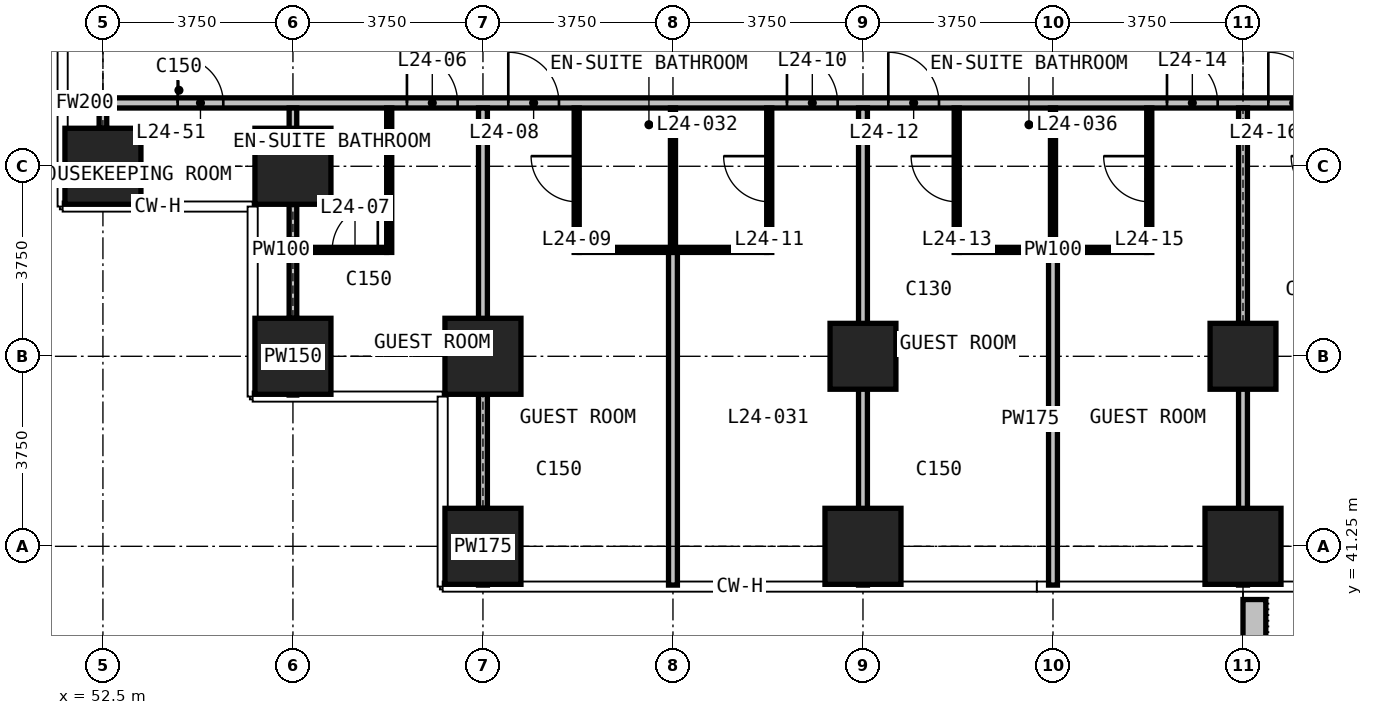
"""IFC4 building model, lengths in metres.
Left out: names, types, materials, properties, quantities, classifications, styles, units other than length and angle.
Written with IfcOpenShell. Run it as: python <this file> out.ifc"""

import sys

from ifc_helpers import new_model, si_unit, direction, frame, frame_2d, origin, origin_2d, place, context, subcontext, project, spatial, rectangle, extrude, element, fill, save


model = new_model("IFC4")
c1 = context("Model", 3, precision=1e-05, world=origin(), true_north=direction((0.0, 1.0)))
c2 = subcontext(c1, "Body", "Model", "MODEL_VIEW")
j1 = project(units=[si_unit("LENGTHUNIT", "METRE"), si_unit("PLANEANGLEUNIT", "RADIAN")], contexts=[c1])
p1 = place(None, origin())
s1 = spatial("IfcSite", under=j1, at=p1, CompositionType="ELEMENT")
p2 = place(p1, origin())
s2 = spatial("IfcBuilding", under=s1, at=p2, CompositionType="ELEMENT")
p3 = place(p2, frame((0.0, 0.0, 98.9)))
s3 = spatial("IfcBuildingStorey", under=s2, at=p3, CompositionType="ELEMENT", Elevation=98.9)
for number, where, z_axis, x_axis in (
    (1, (52.5, 48.75, 0.0), (0.0, 0.0, 1.0), (1.0, 0.0, 0.0)),
    (2, (56.25, 45.0, 0.0), (0.0, 0.0, 1.0), (1.0, 0.0, 0.0)),
    (3, (56.25, 48.75, 0.0), (0.0, 0.0, 1.0), (1.0, 0.0, 0.0)),
    (4, (60.0, 41.25, 0.0), (0.0, 0.0, 1.0), (1.0, 0.0, 0.0)),
    (5, (60.0, 45.0, 0.0), (0.0, 0.0, 1.0), (1.0, 0.0, 0.0)),
    (6, (67.5, 41.25, 0.0), (0.0, 0.0, 1.0), (1.0, 0.0, 0.0)),
):
    element("IfcColumn", number, at=place(p3, frame(where, z_axis=z_axis, x_axis=x_axis)), inside=s3, PredefinedType="COLUMN", context=c2, shape_type="SweptSolid", body=[
        extrude(rectangle(XDim=1.5, YDim=1.5, at=origin_2d()), origin(), (0.0, 0.0, 1.0), 3.3),
    ])
p4 = place(p3, frame((67.5, 45.0, 0.0), z_axis=(0.0, 0.0, 1.0), x_axis=(1.0, 0.0, 0.0)))
e7 = element("IfcColumn", 7, at=p4, inside=s3, PredefinedType="COLUMN", context=c2, shape_type="SweptSolid", body=[
    extrude(rectangle(XDim=1.3, YDim=1.3, at=origin_2d()), origin(), (0.0, 0.0, 1.0), 3.3),
])
p5 = place(p3, frame((75.0, 41.25, 0.0), z_axis=(0.0, 0.0, 1.0), x_axis=(1.0, 0.0, 0.0)))
e8 = element("IfcColumn", 8, at=p5, inside=s3, PredefinedType="COLUMN", context=c2, shape_type="SweptSolid", body=[
    extrude(rectangle(XDim=1.5, YDim=1.5, at=origin_2d()), origin(), (0.0, 0.0, 1.0), 3.3),
])
p6 = place(p3, frame((75.0, 45.0, 0.0), z_axis=(0.0, 0.0, 1.0), x_axis=(1.0, 0.0, 0.0)))
e9 = element("IfcColumn", 9, at=p6, inside=s3, PredefinedType="COLUMN", context=c2, shape_type="SweptSolid", body=[
    extrude(rectangle(XDim=1.3, YDim=1.3, at=origin_2d()), origin(), (0.0, 0.0, 1.0), 3.3),
])
p7 = place(p3, frame((75.225, 40.2, 0.0), z_axis=(0.0, 0.0, 1.0), x_axis=(0.0, -1.0, 0.0)))
e10 = element("IfcWall", 10, at=p7, inside=s3, PredefinedType="USERDEFINED", context=c2, shape_type="SweptSolid", body=[
    extrude(rectangle(XDim=2.35, YDim=0.45, at=frame_2d((1.175, 0.0))), origin(), (0.0, 0.0, 1.0), 1.1),
])
p8 = place(p3, frame((51.855, 50.0, 0.0), z_axis=(0.0, 0.0, 1.0), x_axis=(1.0, 0.0, 0.0)))
e11 = element("IfcWall", 11, at=p8, inside=s3, PredefinedType="PARTITIONING", context=c2, shape_type="SweptSolid", body=[
    extrude(rectangle(XDim=0.57, YDim=0.2, at=frame_2d((0.285, 0.0))), origin(), (0.0, 0.0, 1.0), 2.95),
])
p9 = place(p3, frame((52.575, 50.0, 0.0), z_axis=(0.0, 0.0, 1.0), x_axis=(1.0, 0.0, 0.0)))
e12 = element("IfcWall", 12, at=p9, inside=s3, PredefinedType="PARTITIONING", context=c2, shape_type="SweptSolid", body=[
    extrude(rectangle(XDim=44.85, YDim=0.2, at=frame_2d((22.425, 0.0))), origin(), (0.0, 0.0, 1.0), 2.95),
])
p10 = place(p9, frame((5.925, 0.0, 0.0)))
e13 = element("IfcOpeningElement", 13, at=p10, cuts=e12, PredefinedType="OPENING", context=c2, shape_type="SweptSolid", body=[
    extrude(rectangle(XDim=1.0, YDim=2.2, at=frame_2d((0.5, 1.1))), frame((0.0, 0.11, 0.0), z_axis=(0.0, -1.0, 0.0), x_axis=(1.0, 0.0, 0.0)), (0.0, 0.0, 1.0), 0.22),
])
p11 = place(p9, frame((7.925, 0.0, 0.0)))
e14 = element("IfcOpeningElement", 14, at=p11, cuts=e12, PredefinedType="OPENING", context=c2, shape_type="SweptSolid", body=[
    extrude(rectangle(XDim=1.0, YDim=2.2, at=frame_2d((0.5, 1.1))), frame((0.0, 0.11, 0.0), z_axis=(0.0, -1.0, 0.0), x_axis=(1.0, 0.0, 0.0)), (0.0, 0.0, 1.0), 0.22),
])
p12 = place(p9, frame((13.425, 0.0, 0.0)))
e15 = element("IfcOpeningElement", 15, at=p12, cuts=e12, PredefinedType="OPENING", context=c2, shape_type="SweptSolid", body=[
    extrude(rectangle(XDim=1.0, YDim=2.2, at=frame_2d((0.5, 1.1))), frame((0.0, 0.11, 0.0), z_axis=(0.0, -1.0, 0.0), x_axis=(1.0, 0.0, 0.0)), (0.0, 0.0, 1.0), 0.22),
])
p13 = place(p9, frame((15.425, 0.0, 0.0)))
e16 = element("IfcOpeningElement", 16, at=p13, cuts=e12, PredefinedType="OPENING", context=c2, shape_type="SweptSolid", body=[
    extrude(rectangle(XDim=1.0, YDim=2.2, at=frame_2d((0.5, 1.1))), frame((0.0, 0.11, 0.0), z_axis=(0.0, -1.0, 0.0), x_axis=(1.0, 0.0, 0.0)), (0.0, 0.0, 1.0), 0.22),
])
p14 = place(p9, frame((20.925, 0.0, 0.0)))
e17 = element("IfcOpeningElement", 17, at=p14, cuts=e12, PredefinedType="OPENING", context=c2, shape_type="SweptSolid", body=[
    extrude(rectangle(XDim=1.0, YDim=2.2, at=frame_2d((0.5, 1.1))), frame((0.0, 0.11, 0.0), z_axis=(0.0, -1.0, 0.0), x_axis=(1.0, 0.0, 0.0)), (0.0, 0.0, 1.0), 0.22),
])
p15 = place(p9, frame((22.925, 0.0, 0.0)))
e18 = element("IfcOpeningElement", 18, at=p15, cuts=e12, PredefinedType="OPENING", context=c2, shape_type="SweptSolid", body=[
    extrude(rectangle(XDim=1.0, YDim=2.2, at=frame_2d((0.5, 1.1))), frame((0.0, 0.11, 0.0), z_axis=(0.0, -1.0, 0.0), x_axis=(1.0, 0.0, 0.0)), (0.0, 0.0, 1.0), 0.22),
])
p16 = place(p9, frame((28.425, 0.0, 0.0)))
e19 = element("IfcOpeningElement", 19, at=p16, cuts=e12, PredefinedType="OPENING", context=c2, shape_type="SweptSolid", body=[
    extrude(rectangle(XDim=1.0, YDim=2.2, at=frame_2d((0.5, 1.1))), frame((0.0, 0.11, 0.0), z_axis=(0.0, -1.0, 0.0), x_axis=(1.0, 0.0, 0.0)), (0.0, 0.0, 1.0), 0.22),
])
p17 = place(p9, frame((30.425, 0.0, 0.0)))
e20 = element("IfcOpeningElement", 20, at=p17, cuts=e12, PredefinedType="OPENING", context=c2, shape_type="SweptSolid", body=[
    extrude(rectangle(XDim=1.0, YDim=2.2, at=frame_2d((0.5, 1.1))), frame((0.0, 0.11, 0.0), z_axis=(0.0, -1.0, 0.0), x_axis=(1.0, 0.0, 0.0)), (0.0, 0.0, 1.0), 0.22),
])
p18 = place(p9, frame((35.925, 0.0, 0.0)))
e21 = element("IfcOpeningElement", 21, at=p18, cuts=e12, PredefinedType="OPENING", context=c2, shape_type="SweptSolid", body=[
    extrude(rectangle(XDim=1.0, YDim=2.2, at=frame_2d((0.5, 1.1))), frame((0.0, 0.11, 0.0), z_axis=(0.0, -1.0, 0.0), x_axis=(1.0, 0.0, 0.0)), (0.0, 0.0, 1.0), 0.22),
])
p19 = place(p9, frame((37.925, 0.0, 0.0)))
e22 = element("IfcOpeningElement", 22, at=p19, cuts=e12, PredefinedType="OPENING", context=c2, shape_type="SweptSolid", body=[
    extrude(rectangle(XDim=1.0, YDim=2.2, at=frame_2d((0.5, 1.1))), frame((0.0, 0.11, 0.0), z_axis=(0.0, -1.0, 0.0), x_axis=(1.0, 0.0, 0.0)), (0.0, 0.0, 1.0), 0.22),
])
p20 = place(p9, frame((1.4, 0.0, 0.0)))
e23 = element("IfcOpeningElement", 23, at=p20, cuts=e12, PredefinedType="OPENING", context=c2, shape_type="SweptSolid", body=[
    extrude(rectangle(XDim=0.9, YDim=2.2, at=frame_2d((0.45, 1.1))), frame((0.0, 0.11, 0.0), z_axis=(0.0, -1.0, 0.0), x_axis=(1.0, 0.0, 0.0)), (0.0, 0.0, 1.0), 0.22),
])
p21 = place(p9, frame((42.575, 0.0, 0.0)))
e24 = element("IfcOpeningElement", 24, at=p21, cuts=e12, PredefinedType="OPENING", context=c2, shape_type="SweptSolid", body=[
    extrude(rectangle(XDim=0.9, YDim=2.2, at=frame_2d((0.45, 1.1))), frame((0.0, 0.11, 0.0), z_axis=(0.0, -1.0, 0.0), x_axis=(1.0, 0.0, 0.0)), (0.0, 0.0, 1.0), 0.22),
])
p22 = place(p3, frame((60.0, 40.485, 0.0), z_axis=(0.0, 0.0, 1.0), x_axis=(0.0, 1.0, 0.0)))
e25 = element("IfcWall", 25, at=p22, inside=s3, PredefinedType="PARTITIONING", context=c2, shape_type="SweptSolid", body=[
    extrude(rectangle(XDim=1.515, YDim=0.175, at=frame_2d((0.757, 0.0))), origin(), (0.0, 0.0, 1.0), 2.95),
])
p23 = place(p3, frame((60.0, 42.0, 0.0), z_axis=(0.0, 0.0, 1.0), x_axis=(0.0, 1.0, 0.0)))
e26 = element("IfcWall", 26, at=p23, inside=s3, PredefinedType="PARTITIONING", context=c2, shape_type="SweptSolid", body=[
    extrude(rectangle(XDim=2.251, YDim=0.175, at=frame_2d((1.125, 0.0))), origin(), (0.0, 0.0, 1.0), 2.15),
])
p24 = place(p3, frame((60.0, 44.251, 0.0), z_axis=(0.0, 0.0, 1.0), x_axis=(0.0, 1.0, 0.0)))
e27 = element("IfcWall", 27, at=p24, inside=s3, PredefinedType="PARTITIONING", context=c2, shape_type="SweptSolid", body=[
    extrude(rectangle(XDim=5.649, YDim=0.175, at=frame_2d((2.824, 0.0))), origin(), (0.0, 0.0, 1.0), 2.95),
])
p25 = place(p3, frame((63.75, 40.485, 0.0), z_axis=(0.0, 0.0, 1.0), x_axis=(0.0, 1.0, 0.0)))
e28 = element("IfcWall", 28, at=p25, inside=s3, PredefinedType="PARTITIONING", context=c2, shape_type="SweptSolid", body=[
    extrude(rectangle(XDim=6.565, YDim=0.175, at=frame_2d((3.282, 0.0))), origin(), (0.0, 0.0, 1.0), 2.95),
])
p26 = place(p3, frame((67.5, 40.485, 0.0), z_axis=(0.0, 0.0, 1.0), x_axis=(0.0, 1.0, 0.0)))
e29 = element("IfcWall", 29, at=p26, inside=s3, PredefinedType="PARTITIONING", context=c2, shape_type="SweptSolid", body=[
    extrude(rectangle(XDim=9.415, YDim=0.175, at=frame_2d((4.708, 0.0))), origin(), (0.0, 0.0, 1.0), 2.95),
])
p27 = place(p3, frame((71.25, 40.485, 0.0), z_axis=(0.0, 0.0, 1.0), x_axis=(0.0, 1.0, 0.0)))
e30 = element("IfcWall", 30, at=p27, inside=s3, PredefinedType="PARTITIONING", context=c2, shape_type="SweptSolid", body=[
    extrude(rectangle(XDim=6.565, YDim=0.175, at=frame_2d((3.282, 0.0))), origin(), (0.0, 0.0, 1.0), 2.95),
])
p28 = place(p3, frame((75.0, 40.485, 0.0), z_axis=(0.0, 0.0, 1.0), x_axis=(0.0, 1.0, 0.0)))
e31 = element("IfcWall", 31, at=p28, inside=s3, PredefinedType="PARTITIONING", context=c2, shape_type="SweptSolid", body=[
    extrude(rectangle(XDim=5.164, YDim=0.175, at=frame_2d((2.582, 0.0))), origin(), (0.0, 0.0, 1.0), 2.95),
])
p29 = place(p3, frame((75.0, 45.649, 0.0), z_axis=(0.0, 0.0, 1.0), x_axis=(0.0, 1.0, 0.0)))
e32 = element("IfcWall", 32, at=p29, inside=s3, PredefinedType="PARTITIONING", context=c2, shape_type="SweptSolid", body=[
    extrude(rectangle(XDim=4.251, YDim=0.175, at=frame_2d((2.125, 0.0))), origin(), (0.0, 0.0, 1.0), 2.05),
])
p30 = place(p3, frame((52.5, 48.105, 0.0), z_axis=(0.0, 0.0, 1.0), x_axis=(0.0, 1.0, 0.0)))
e33 = element("IfcWall", 33, at=p30, inside=s3, PredefinedType="PARTITIONING", context=c2, shape_type="SweptSolid", body=[
    extrude(rectangle(XDim=1.395, YDim=0.15, at=frame_2d((0.698, 0.0))), origin(), (0.0, 0.0, 1.0), 2.95),
])
p31 = place(p3, frame((52.5, 49.5, 0.0), z_axis=(0.0, 0.0, 1.0), x_axis=(0.0, 1.0, 0.0)))
e34 = element("IfcWall", 34, at=p31, inside=s3, PredefinedType="PARTITIONING", context=c2, shape_type="SweptSolid", body=[
    extrude(rectangle(XDim=0.6, YDim=0.15, at=frame_2d((0.3, 0.0))), origin(), (0.0, 0.0, 1.0), 2.15),
])
p32 = place(p3, frame((56.25, 44.235, 0.0), z_axis=(0.0, 0.0, 1.0), x_axis=(0.0, 1.0, 0.0)))
e35 = element("IfcWall", 35, at=p32, inside=s3, PredefinedType="PARTITIONING", context=c2, shape_type="SweptSolid", body=[
    extrude(rectangle(XDim=1.515, YDim=0.15, at=frame_2d((0.757, 0.0))), origin(), (0.0, 0.0, 1.0), 2.95),
])
p33 = place(p3, frame((56.25, 45.75, 0.0), z_axis=(0.0, 0.0, 1.0), x_axis=(0.0, 1.0, 0.0)))
e36 = element("IfcWall", 36, at=p33, inside=s3, PredefinedType="PARTITIONING", context=c2, shape_type="SweptSolid", body=[
    extrude(rectangle(XDim=2.251, YDim=0.15, at=frame_2d((1.125, 0.0))), origin(), (0.0, 0.0, 1.0), 2.15),
])
p34 = place(p3, frame((56.25, 48.001, 0.0), z_axis=(0.0, 0.0, 1.0), x_axis=(0.0, 1.0, 0.0)))
e37 = element("IfcWall", 37, at=p34, inside=s3, PredefinedType="PARTITIONING", context=c2, shape_type="SweptSolid", body=[
    extrude(rectangle(XDim=1.899, YDim=0.15, at=frame_2d((0.949, 0.0))), origin(), (0.0, 0.0, 1.0), 2.95),
])
p35 = place(p3, frame((56.325, 47.1, 0.0), z_axis=(0.0, 0.0, 1.0), x_axis=(1.0, 0.0, 0.0)))
e38 = element("IfcWall", 38, at=p35, inside=s3, PredefinedType="PARTITIONING", context=c2, shape_type="SweptSolid", body=[
    extrude(rectangle(XDim=1.775, YDim=0.1, at=frame_2d((0.888, 0.0))), origin(), (0.0, 0.0, 1.0), 2.95),
])
p36 = place(p35, frame((0.7, 0.0, 0.0)))
e39 = element("IfcOpeningElement", 39, at=p36, cuts=e38, PredefinedType="OPENING", context=c2, shape_type="SweptSolid", body=[
    extrude(rectangle(XDim=0.9, YDim=2.2, at=frame_2d((0.45, 1.1))), frame((0.0, 0.06, 0.0), z_axis=(0.0, -1.0, 0.0), x_axis=(1.0, 0.0, 0.0)), (0.0, 0.0, 1.0), 0.12),
])
for number, where, z_axis, x_axis in (
    (40, (61.9, 47.1, 0.0), (0.0, 0.0, 1.0), (1.0, 0.0, 0.0)),
    (41, (69.4, 47.1, 0.0), (0.0, 0.0, 1.0), (1.0, 0.0, 0.0)),
):
    element("IfcWall", number, at=place(p3, frame(where, z_axis=z_axis, x_axis=x_axis)), inside=s3, PredefinedType="PARTITIONING", context=c2, shape_type="SweptSolid", body=[
        extrude(rectangle(XDim=3.7, YDim=0.1, at=frame_2d((1.85, 0.0))), origin(), (0.0, 0.0, 1.0), 2.95),
    ])
p37 = place(p3, frame((58.15, 47.05, 0.0), z_axis=(0.0, 0.0, 1.0), x_axis=(0.0, 1.0, 0.0)))
e42 = element("IfcWall", 42, at=p37, inside=s3, PredefinedType="PARTITIONING", context=c2, shape_type="SweptSolid", body=[
    extrude(rectangle(XDim=2.85, YDim=0.1, at=frame_2d((1.425, 0.0))), origin(), (0.0, 0.0, 1.0), 2.95),
])
p38 = place(p3, frame((61.85, 47.05, 0.0), z_axis=(0.0, 0.0, 1.0), x_axis=(0.0, 1.0, 0.0)))
e43 = element("IfcWall", 43, at=p38, inside=s3, PredefinedType="PARTITIONING", context=c2, shape_type="SweptSolid", body=[
    extrude(rectangle(XDim=2.85, YDim=0.1, at=frame_2d((1.425, 0.0))), origin(), (0.0, 0.0, 1.0), 2.95),
])
p39 = place(p38, frame((1.0, 0.0, 0.0)))
e44 = element("IfcOpeningElement", 44, at=p39, cuts=e43, PredefinedType="OPENING", context=c2, shape_type="SweptSolid", body=[
    extrude(rectangle(XDim=0.9, YDim=2.2, at=frame_2d((0.45, 1.1))), frame((0.0, 0.06, 0.0), z_axis=(0.0, -1.0, 0.0), x_axis=(1.0, 0.0, 0.0)), (0.0, 0.0, 1.0), 0.12),
])
p40 = place(p3, frame((63.75, 47.15, 0.0), z_axis=(0.0, 0.0, 1.0), x_axis=(0.0, 1.0, 0.0)))
e45 = element("IfcWall", 45, at=p40, inside=s3, PredefinedType="PARTITIONING", context=c2, shape_type="SweptSolid", body=[
    extrude(rectangle(XDim=2.75, YDim=0.1, at=frame_2d((1.375, 0.0))), origin(), (0.0, 0.0, 1.0), 2.95),
])
p41 = place(p3, frame((65.65, 47.05, 0.0), z_axis=(0.0, 0.0, 1.0), x_axis=(0.0, 1.0, 0.0)))
e46 = element("IfcWall", 46, at=p41, inside=s3, PredefinedType="PARTITIONING", context=c2, shape_type="SweptSolid", body=[
    extrude(rectangle(XDim=2.85, YDim=0.1, at=frame_2d((1.425, 0.0))), origin(), (0.0, 0.0, 1.0), 2.95),
])
p42 = place(p41, frame((1.0, 0.0, 0.0)))
e47 = element("IfcOpeningElement", 47, at=p42, cuts=e46, PredefinedType="OPENING", context=c2, shape_type="SweptSolid", body=[
    extrude(rectangle(XDim=0.9, YDim=2.2, at=frame_2d((0.45, 1.1))), frame((0.0, 0.06, 0.0), z_axis=(0.0, -1.0, 0.0), x_axis=(1.0, 0.0, 0.0)), (0.0, 0.0, 1.0), 0.12),
])
p43 = place(p3, frame((69.35, 47.05, 0.0), z_axis=(0.0, 0.0, 1.0), x_axis=(0.0, 1.0, 0.0)))
e48 = element("IfcWall", 48, at=p43, inside=s3, PredefinedType="PARTITIONING", context=c2, shape_type="SweptSolid", body=[
    extrude(rectangle(XDim=2.85, YDim=0.1, at=frame_2d((1.425, 0.0))), origin(), (0.0, 0.0, 1.0), 2.95),
])
p44 = place(p43, frame((1.0, 0.0, 0.0)))
e49 = element("IfcOpeningElement", 49, at=p44, cuts=e48, PredefinedType="OPENING", context=c2, shape_type="SweptSolid", body=[
    extrude(rectangle(XDim=0.9, YDim=2.2, at=frame_2d((0.45, 1.1))), frame((0.0, 0.06, 0.0), z_axis=(0.0, -1.0, 0.0), x_axis=(1.0, 0.0, 0.0)), (0.0, 0.0, 1.0), 0.12),
])
p45 = place(p3, frame((71.25, 47.15, 0.0), z_axis=(0.0, 0.0, 1.0), x_axis=(0.0, 1.0, 0.0)))
e50 = element("IfcWall", 50, at=p45, inside=s3, PredefinedType="PARTITIONING", context=c2, shape_type="SweptSolid", body=[
    extrude(rectangle(XDim=2.75, YDim=0.1, at=frame_2d((1.375, 0.0))), origin(), (0.0, 0.0, 1.0), 2.95),
])
p46 = place(p3, frame((73.15, 47.05, 0.0), z_axis=(0.0, 0.0, 1.0), x_axis=(0.0, 1.0, 0.0)))
e51 = element("IfcWall", 51, at=p46, inside=s3, PredefinedType="PARTITIONING", context=c2, shape_type="SweptSolid", body=[
    extrude(rectangle(XDim=2.85, YDim=0.1, at=frame_2d((1.425, 0.0))), origin(), (0.0, 0.0, 1.0), 2.95),
])
p47 = place(p46, frame((1.0, 0.0, 0.0)))
e52 = element("IfcOpeningElement", 52, at=p47, cuts=e51, PredefinedType="OPENING", context=c2, shape_type="SweptSolid", body=[
    extrude(rectangle(XDim=0.9, YDim=2.2, at=frame_2d((0.45, 1.1))), frame((0.0, 0.06, 0.0), z_axis=(0.0, -1.0, 0.0), x_axis=(1.0, 0.0, 0.0)), (0.0, 0.0, 1.0), 0.12),
])
p48 = place(p10, origin())
e53 = element("IfcDoor", 53, at=p48, inside=s3, OperationType="SINGLE_SWING_LEFT", PredefinedType="DOOR", context=c2, shape_type="SweptSolid", body=[
    extrude(rectangle(XDim=1.0, YDim=2.2, at=frame_2d((0.5, 1.1))), frame((0.0, 0.025, 0.0), z_axis=(0.0, -1.0, 0.0), x_axis=(1.0, 0.0, 0.0)), (0.0, 0.0, 1.0), 0.05),
])
fill(e13, e53)
p49 = place(p36, origin())
e54 = element("IfcDoor", 54, at=p49, inside=s3, OperationType="SINGLE_SWING_RIGHT", PredefinedType="DOOR", context=c2, shape_type="SweptSolid", body=[
    extrude(rectangle(XDim=0.9, YDim=2.2, at=frame_2d((0.45, 1.1))), frame((0.0, 0.025, 0.0), z_axis=(0.0, -1.0, 0.0), x_axis=(1.0, 0.0, 0.0)), (0.0, 0.0, 1.0), 0.05),
])
fill(e39, e54)
p50 = place(p11, origin())
e55 = element("IfcDoor", 55, at=p50, inside=s3, OperationType="SINGLE_SWING_RIGHT", PredefinedType="DOOR", context=c2, shape_type="SweptSolid", body=[
    extrude(rectangle(XDim=1.0, YDim=2.2, at=frame_2d((0.5, 1.1))), frame((0.0, 0.025, 0.0), z_axis=(0.0, -1.0, 0.0), x_axis=(1.0, 0.0, 0.0)), (0.0, 0.0, 1.0), 0.05),
])
fill(e14, e55)
p51 = place(p39, origin())
e56 = element("IfcDoor", 56, at=p51, inside=s3, OperationType="SINGLE_SWING_RIGHT", PredefinedType="DOOR", context=c2, shape_type="SweptSolid", body=[
    extrude(rectangle(XDim=0.9, YDim=2.2, at=frame_2d((0.45, 1.1))), frame((0.0, 0.025, 0.0), z_axis=(0.0, -1.0, 0.0), x_axis=(1.0, 0.0, 0.0)), (0.0, 0.0, 1.0), 0.05),
])
fill(e44, e56)
p52 = place(p12, origin())
e57 = element("IfcDoor", 57, at=p52, inside=s3, OperationType="SINGLE_SWING_LEFT", PredefinedType="DOOR", context=c2, shape_type="SweptSolid", body=[
    extrude(rectangle(XDim=1.0, YDim=2.2, at=frame_2d((0.5, 1.1))), frame((0.0, 0.025, 0.0), z_axis=(0.0, -1.0, 0.0), x_axis=(1.0, 0.0, 0.0)), (0.0, 0.0, 1.0), 0.05),
])
fill(e15, e57)
p53 = place(p42, origin())
e58 = element("IfcDoor", 58, at=p53, inside=s3, OperationType="SINGLE_SWING_RIGHT", PredefinedType="DOOR", context=c2, shape_type="SweptSolid", body=[
    extrude(rectangle(XDim=0.9, YDim=2.2, at=frame_2d((0.45, 1.1))), frame((0.0, 0.025, 0.0), z_axis=(0.0, -1.0, 0.0), x_axis=(1.0, 0.0, 0.0)), (0.0, 0.0, 1.0), 0.05),
])
fill(e47, e58)
p54 = place(p13, origin())
e59 = element("IfcDoor", 59, at=p54, inside=s3, OperationType="SINGLE_SWING_LEFT", PredefinedType="DOOR", context=c2, shape_type="SweptSolid", body=[
    extrude(rectangle(XDim=1.0, YDim=2.2, at=frame_2d((0.5, 1.1))), frame((0.0, 0.025, 0.0), z_axis=(0.0, -1.0, 0.0), x_axis=(1.0, 0.0, 0.0)), (0.0, 0.0, 1.0), 0.05),
])
fill(e16, e59)
p55 = place(p44, origin())
e60 = element("IfcDoor", 60, at=p55, inside=s3, OperationType="SINGLE_SWING_RIGHT", PredefinedType="DOOR", context=c2, shape_type="SweptSolid", body=[
    extrude(rectangle(XDim=0.9, YDim=2.2, at=frame_2d((0.45, 1.1))), frame((0.0, 0.025, 0.0), z_axis=(0.0, -1.0, 0.0), x_axis=(1.0, 0.0, 0.0)), (0.0, 0.0, 1.0), 0.05),
])
fill(e49, e60)
p56 = place(p14, origin())
e61 = element("IfcDoor", 61, at=p56, inside=s3, OperationType="SINGLE_SWING_LEFT", PredefinedType="DOOR", context=c2, shape_type="SweptSolid", body=[
    extrude(rectangle(XDim=1.0, YDim=2.2, at=frame_2d((0.5, 1.1))), frame((0.0, 0.025, 0.0), z_axis=(0.0, -1.0, 0.0), x_axis=(1.0, 0.0, 0.0)), (0.0, 0.0, 1.0), 0.05),
])
fill(e17, e61)
p57 = place(p47, origin())
e62 = element("IfcDoor", 62, at=p57, inside=s3, OperationType="SINGLE_SWING_RIGHT", PredefinedType="DOOR", context=c2, shape_type="SweptSolid", body=[
    extrude(rectangle(XDim=0.9, YDim=2.2, at=frame_2d((0.45, 1.1))), frame((0.0, 0.025, 0.0), z_axis=(0.0, -1.0, 0.0), x_axis=(1.0, 0.0, 0.0)), (0.0, 0.0, 1.0), 0.05),
])
fill(e52, e62)
p58 = place(p15, origin())
e63 = element("IfcDoor", 63, at=p58, inside=s3, OperationType="SINGLE_SWING_LEFT", PredefinedType="DOOR", context=c2, shape_type="SweptSolid", body=[
    extrude(rectangle(XDim=1.0, YDim=2.2, at=frame_2d((0.5, 1.1))), frame((0.0, 0.025, 0.0), z_axis=(0.0, -1.0, 0.0), x_axis=(1.0, 0.0, 0.0)), (0.0, 0.0, 1.0), 0.05),
])
fill(e18, e63)
p59 = place(p20, origin())
e64 = element("IfcDoor", 64, at=p59, inside=s3, OperationType="SINGLE_SWING_RIGHT", PredefinedType="DOOR", context=c2, shape_type="SweptSolid", body=[
    extrude(rectangle(XDim=0.9, YDim=2.2, at=frame_2d((0.45, 1.1))), frame((0.0, 0.025, 0.0), z_axis=(0.0, -1.0, 0.0), x_axis=(1.0, 0.0, 0.0)), (0.0, 0.0, 1.0), 0.05),
])
fill(e23, e64)
save(model, sys.argv[1])
